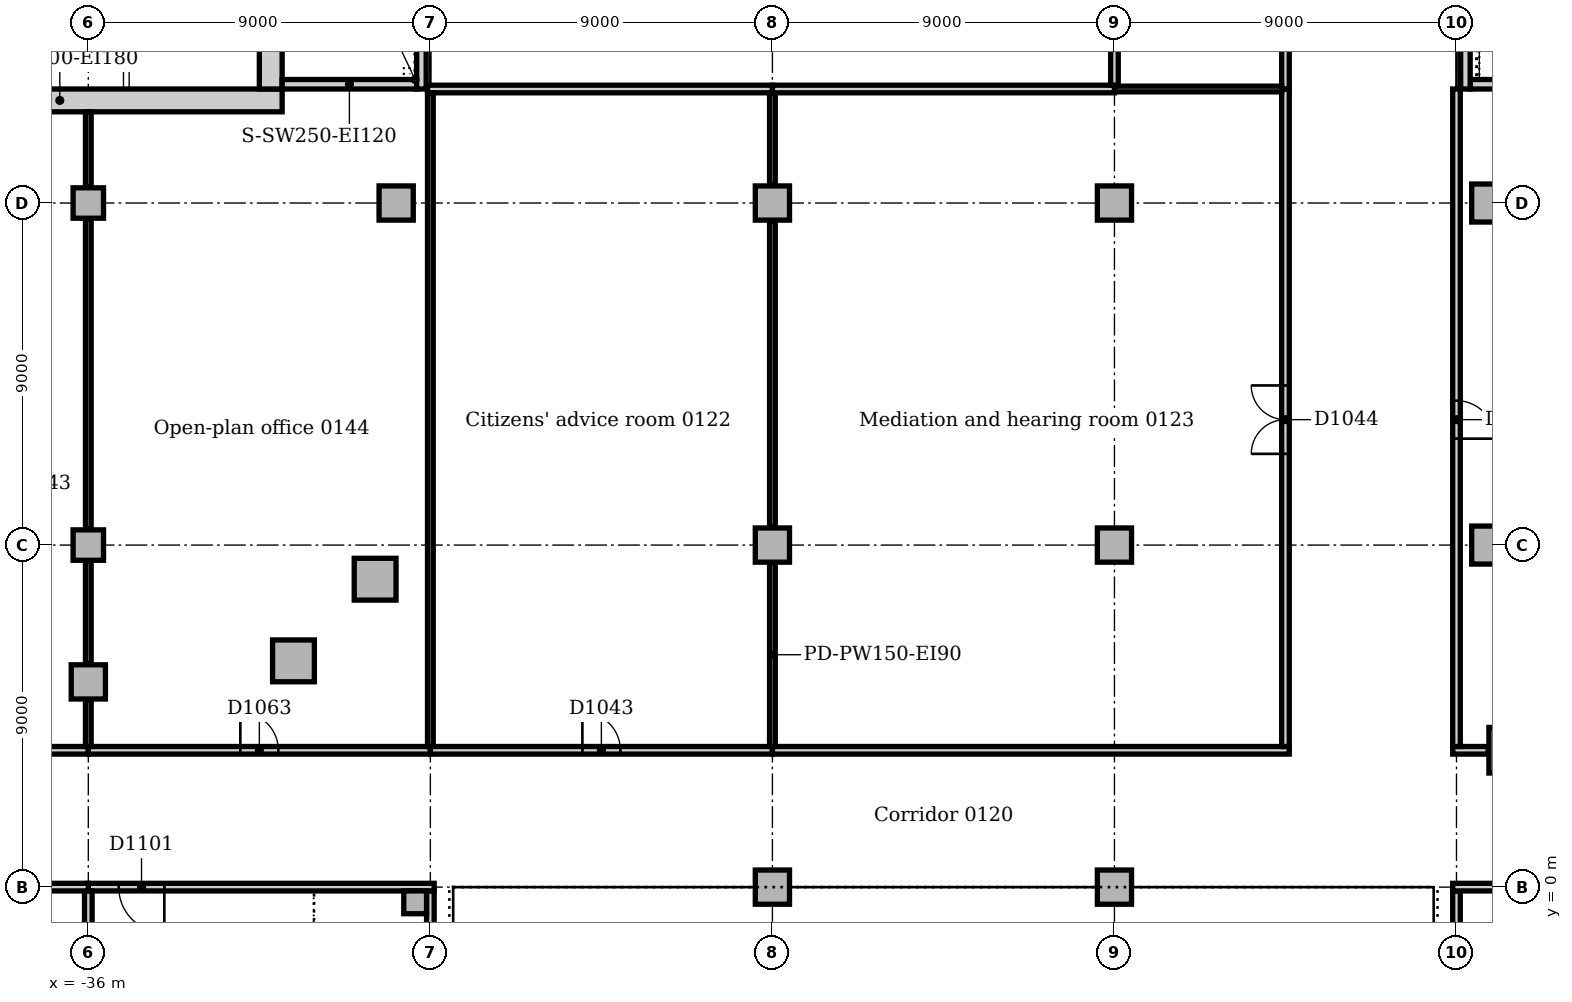
"""IFC4 building model, lengths in metres.
Left out: names, types, materials, properties, quantities, classifications, styles, units other than length and angle.
Written with IfcOpenShell. Run it as: python <this file> out.ifc"""

import sys

from ifc_helpers import new_model, si_unit, direction, frame, frame_2d, origin, origin_2d, place, context, subcontext, project, spatial, rectangle, extrude, element, fill, save


model = new_model("IFC4")
c1 = context("Model", 3, precision=1e-05, world=origin(), true_north=direction((0.0, 1.0)))
c2 = subcontext(c1, "Body", "Model", "MODEL_VIEW")
j1 = project(units=[si_unit("LENGTHUNIT", "METRE"), si_unit("PLANEANGLEUNIT", "RADIAN")], contexts=[c1])
p1 = place(None, origin())
s1 = spatial("IfcSite", under=j1, at=p1, CompositionType="ELEMENT")
p2 = place(p1, origin())
s2 = spatial("IfcBuilding", under=s1, at=p2, CompositionType="ELEMENT")
p3 = place(p2, frame((0.0, 0.0, 6.0)))
s3 = spatial("IfcBuildingStorey", under=s2, at=p3, CompositionType="ELEMENT", Elevation=6.0)
p4 = place(p3, frame((0.36, 21.125, 0.0), z_axis=(0.0, 0.0, 1.0), x_axis=(1.0, 0.0, 0.0)))
e1 = element("IfcWall", 1, at=p4, inside=s3, PredefinedType="SOLIDWALL", context=c2, shape_type="SweptSolid", body=[
    extrude(rectangle(XDim=3.54, YDim=0.25, at=frame_2d((1.77, 0.0))), origin(), (0.0, 0.0, 1.0), 5.0),
])
p5 = place(p3, frame((0.235, 21.0, 0.0), z_axis=(0.0, 0.0, 1.0), x_axis=(0.0, 1.0, 0.0)))
e2 = element("IfcWall", 2, at=p5, inside=s3, PredefinedType="SOLIDWALL", context=c2, shape_type="SweptSolid", body=[
    extrude(rectangle(XDim=21.0, YDim=0.25, at=frame_2d((10.5, 0.0))), origin(), (0.0, 0.0, 1.0), 5.0),
])
p6 = place(p3, frame((1.453, 3.602, 0.0), z_axis=(0.0, 0.0, 1.0), x_axis=(1.0, 0.0, 0.0)))
e3 = element("IfcColumn", 3, at=p6, inside=s3, PredefinedType="COLUMN", context=c2, shape_type="SweptSolid", body=[
    extrude(rectangle(XDim=1.2, YDim=1.2, at=origin_2d()), origin(), (0.0, 0.0, 1.0), 4.7),
])
for number, where, z_axis, x_axis in (
    (4, (0.9, 9.0, 0.0), (0.0, 0.0, 1.0), (1.0, 0.0, 0.0)),
    (5, (0.9, 18.0, 0.0), (0.0, 0.0, 1.0), (1.0, 0.0, 0.0)),
):
    element("IfcColumn", number, at=place(p3, frame(where, z_axis=z_axis, x_axis=x_axis)), inside=s3, PredefinedType="COLUMN", context=c2, shape_type="SweptSolid", body=[
        extrude(rectangle(XDim=1.0, YDim=1.0, at=origin_2d()), origin(), (0.0, 0.0, 1.0), 4.7),
    ])
p7 = place(p3, frame((-42.6, 20.7, 0.0), z_axis=(0.0, 0.0, 1.0), x_axis=(1.0, 0.0, 0.0)))
e6 = element("IfcWall", 6, at=p7, inside=s3, PredefinedType="SOLIDWALL", context=c2, shape_type="SweptSolid", body=[
    extrude(rectangle(XDim=11.7, YDim=0.6, at=frame_2d((5.85, 0.0))), origin(), (0.0, 0.0, 1.0), 5.0),
])
p8 = place(p3, frame((-31.2, 21.0, 0.0), z_axis=(0.0, 0.0, 1.0), x_axis=(0.0, 1.0, 0.0)))
e7 = element("IfcWall", 7, at=p8, inside=s3, PredefinedType="SOLIDWALL", context=c2, shape_type="SweptSolid", body=[
    extrude(rectangle(XDim=9.5, YDim=0.6, at=frame_2d((4.75, 0.0))), origin(), (0.0, 0.0, 1.0), 5.0),
])
p9 = place(p8, frame((5.25, 0.0, 0.0)))
e8 = element("IfcOpeningElement", 8, at=p9, cuts=e7, PredefinedType="OPENING", context=c2, shape_type="SweptSolid", body=[
    extrude(rectangle(XDim=1.0, YDim=2.1, at=frame_2d((0.5, 1.05))), frame((0.0, 0.31, 0.0), z_axis=(0.0, -1.0, 0.0), x_axis=(1.0, 0.0, 0.0)), (0.0, 0.0, 1.0), 0.62),
])
p10 = place(p3, frame((-30.9, 21.125, 0.0), z_axis=(0.0, 0.0, 1.0), x_axis=(1.0, 0.0, 0.0)))
e9 = element("IfcWall", 9, at=p10, inside=s3, PredefinedType="SOLIDWALL", context=c2, shape_type="SweptSolid", body=[
    extrude(rectangle(XDim=3.54, YDim=0.25, at=frame_2d((1.77, 0.0))), origin(), (0.0, 0.0, 1.0), 5.0),
])
p11 = place(p3, frame((-27.235, 21.0, 0.0), z_axis=(0.0, 0.0, 1.0), x_axis=(0.0, 1.0, 0.0)))
e10 = element("IfcWall", 10, at=p11, inside=s3, PredefinedType="SOLIDWALL", context=c2, shape_type="SweptSolid", body=[
    extrude(rectangle(XDim=6.65, YDim=0.25, at=frame_2d((3.325, 0.0))), origin(), (0.0, 0.0, 1.0), 5.0),
])
for number, where, z_axis, x_axis in (
    (11, (-30.602, 5.953, 0.0), (0.0, 0.0, 1.0), (1.0, 0.0, 0.0)),
    (12, (-28.453, 8.102, 0.0), (0.0, 0.0, 1.0), (1.0, 0.0, 0.0)),
):
    element("IfcColumn", number, at=place(p3, frame(where, z_axis=z_axis, x_axis=x_axis)), inside=s3, PredefinedType="COLUMN", context=c2, shape_type="SweptSolid", body=[
        extrude(rectangle(XDim=1.1, YDim=1.1, at=origin_2d()), origin(), (0.0, 0.0, 1.0), 4.7),
    ])
for number, where, z_axis, x_axis in (
    (13, (-36.0, 5.4, 0.0), (0.0, 0.0, 1.0), (1.0, 0.0, 0.0)),
    (14, (-27.9, 18.0, 0.0), (0.0, 0.0, 1.0), (1.0, 0.0, 0.0)),
):
    element("IfcColumn", number, at=place(p3, frame(where, z_axis=z_axis, x_axis=x_axis)), inside=s3, PredefinedType="COLUMN", context=c2, shape_type="SweptSolid", body=[
        extrude(rectangle(XDim=0.9, YDim=0.9, at=origin_2d()), origin(), (0.0, 0.0, 1.0), 4.7),
    ])
for number, where, z_axis, x_axis in (
    (15, (-36.0, 9.0, 0.0), (0.0, 0.0, 1.0), (1.0, 0.0, 0.0)),
    (16, (-36.0, 18.0, 0.0), (0.0, 0.0, 1.0), (1.0, 0.0, 0.0)),
):
    element("IfcColumn", number, at=place(p3, frame(where, z_axis=z_axis, x_axis=x_axis)), inside=s3, PredefinedType="COLUMN", context=c2, shape_type="SweptSolid", body=[
        extrude(rectangle(XDim=0.8, YDim=0.8, at=origin_2d()), origin(), (0.0, 0.0, 1.0), 4.7),
    ])
for number, where, z_axis, x_axis in (
    (17, (-18.0, 0.0, 0.0), (0.0, 0.0, 1.0), (1.0, 0.0, 0.0)),
    (18, (-18.0, 9.0, 0.0), (0.0, 0.0, 1.0), (1.0, 0.0, 0.0)),
    (19, (-18.0, 18.0, 0.0), (0.0, 0.0, 1.0), (1.0, 0.0, 0.0)),
    (20, (-9.0, 0.0, 0.0), (0.0, 0.0, 1.0), (1.0, 0.0, 0.0)),
    (21, (-9.0, 9.0, 0.0), (0.0, 0.0, 1.0), (1.0, 0.0, 0.0)),
    (22, (-9.0, 18.0, 0.0), (0.0, 0.0, 1.0), (1.0, 0.0, 0.0)),
):
    element("IfcColumn", number, at=place(p3, frame(where, z_axis=z_axis, x_axis=x_axis)), inside=s3, PredefinedType="COLUMN", context=c2, shape_type="SweptSolid", body=[
        extrude(rectangle(XDim=0.9, YDim=0.9, at=origin_2d()), origin(), (0.0, 0.0, 1.0), 4.7),
    ])
p12 = place(p3, frame((-27.4, -0.4, 0.0), z_axis=(0.0, 0.0, 1.0), x_axis=(1.0, 0.0, 0.0)))
e23 = element("IfcColumn", 23, at=p12, inside=s3, PredefinedType="COLUMN", context=c2, shape_type="SweptSolid", body=[
    extrude(rectangle(XDim=0.6, YDim=0.6, at=origin_2d()), origin(), (0.0, 0.0, 1.0), 5.0),
])
p13 = place(p3, frame((-27.0, -4.65, 0.0), z_axis=(0.0, 0.0, 1.0), x_axis=(0.0, 1.0, 0.0)))
e24 = element("IfcWall", 24, at=p13, inside=s3, PredefinedType="PARTITIONING", context=c2, shape_type="SweptSolid", body=[
    extrude(rectangle(XDim=4.55, YDim=0.2, at=frame_2d((2.275, 0.0))), origin(), (0.0, 0.0, 1.0), 4.7),
])
p14 = place(p3, frame((-36.0, 0.0, 0.0), z_axis=(0.0, 0.0, 1.0), x_axis=(1.0, 0.0, 0.0)))
e25 = element("IfcWall", 25, at=p14, inside=s3, PredefinedType="SOLIDWALL", context=c2, shape_type="SweptSolid", body=[
    extrude(rectangle(XDim=9.1, YDim=0.2, at=frame_2d((4.55, 0.0))), origin(), (0.0, 0.0, 1.0), 4.7),
])
p15 = place(p14, frame((0.8, 0.0, 0.0)))
e26 = element("IfcOpeningElement", 26, at=p15, cuts=e25, PredefinedType="OPENING", context=c2, shape_type="SweptSolid", body=[
    extrude(rectangle(XDim=1.2, YDim=2.1, at=frame_2d((0.6, 1.05))), frame((0.0, 0.11, 0.0), z_axis=(0.0, -1.0, 0.0), x_axis=(1.0, 0.0, 0.0)), (0.0, 0.0, 1.0), 0.22),
])
p16 = place(p3, frame((-36.0, -4.55, 0.0), z_axis=(0.0, 0.0, 1.0), x_axis=(0.0, 1.0, 0.0)))
e27 = element("IfcWall", 27, at=p16, inside=s3, PredefinedType="SOLIDWALL", context=c2, shape_type="SweptSolid", body=[
    extrude(rectangle(XDim=4.45, YDim=0.2, at=frame_2d((2.225, 0.0))), origin(), (0.0, 0.0, 1.0), 4.7),
])
p17 = place(p3, frame((0.0, -8.53, 0.0), z_axis=(0.0, 0.0, 1.0), x_axis=(0.0, 1.0, 0.0)))
e28 = element("IfcWall", 28, at=p17, inside=s3, PredefinedType="PARTITIONING", context=c2, shape_type="SweptSolid", body=[
    extrude(rectangle(XDim=8.43, YDim=0.2, at=frame_2d((4.215, 0.0))), origin(), (0.0, 0.0, 1.0), 4.7),
])
p18 = place(p3, frame((-45.0, 0.0, 0.0), z_axis=(0.0, 0.0, 1.0), x_axis=(1.0, 0.0, 0.0)))
e29 = element("IfcWall", 29, at=p18, inside=s3, PredefinedType="PARTITIONING", context=c2, shape_type="SweptSolid", body=[
    extrude(rectangle(XDim=9.0, YDim=0.2, at=frame_2d((4.5, 0.0))), origin(), (0.0, 0.0, 1.0), 4.7),
])
p19 = place(p18, frame((4.0, 0.0, 0.0)))
e30 = element("IfcOpeningElement", 30, at=p19, cuts=e29, PredefinedType="OPENING", context=c2, shape_type="SweptSolid", body=[
    extrude(rectangle(XDim=1.0, YDim=2.1, at=frame_2d((0.5, 1.05))), frame((0.0, 0.11, 0.0), z_axis=(0.0, -1.0, 0.0), x_axis=(1.0, 0.0, 0.0)), (0.0, 0.0, 1.0), 0.22),
])
p20 = place(p3, frame((-42.1, 3.6, 0.0), z_axis=(0.0, 0.0, 1.0), x_axis=(1.0, 0.0, 0.0)))
e31 = element("IfcWall", 31, at=p20, inside=s3, PredefinedType="PARTITIONING", context=c2, shape_type="SweptSolid", body=[
    extrude(rectangle(XDim=6.1, YDim=0.2, at=frame_2d((3.05, 0.0))), origin(), (0.0, 0.0, 1.0), 4.7),
])
p21 = place(p3, frame((-36.0, 3.6, 0.0), z_axis=(0.0, 0.0, 1.0), x_axis=(1.0, 0.0, 0.0)))
e32 = element("IfcWall", 32, at=p21, inside=s3, PredefinedType="PARTITIONING", context=c2, shape_type="SweptSolid", body=[
    extrude(rectangle(XDim=9.0, YDim=0.2, at=frame_2d((4.5, 0.0))), origin(), (0.0, 0.0, 1.0), 4.7),
])
p22 = place(p21, frame((4.0, 0.0, 0.0)))
e33 = element("IfcOpeningElement", 33, at=p22, cuts=e32, PredefinedType="OPENING", context=c2, shape_type="SweptSolid", body=[
    extrude(rectangle(XDim=1.0, YDim=2.1, at=frame_2d((0.5, 1.05))), frame((0.0, 0.11, 0.0), z_axis=(0.0, -1.0, 0.0), x_axis=(1.0, 0.0, 0.0)), (0.0, 0.0, 1.0), 0.22),
])
p23 = place(p3, frame((-0.1, 0.0, 0.0), z_axis=(0.0, 0.0, 1.0), x_axis=(1.0, 0.0, 0.0)))
e34 = element("IfcWall", 34, at=p23, inside=s3, PredefinedType="PARTITIONING", context=c2, shape_type="SweptSolid", body=[
    extrude(rectangle(XDim=9.1, YDim=0.2, at=frame_2d((4.55, 0.0))), origin(), (0.0, 0.0, 1.0), 4.7),
])
p24 = place(p23, frame((4.4, 0.0, 0.0)))
e35 = element("IfcOpeningElement", 35, at=p24, cuts=e34, PredefinedType="OPENING", context=c2, shape_type="SweptSolid", body=[
    extrude(rectangle(XDim=1.0, YDim=2.1, at=frame_2d((0.5, 1.05))), frame((0.0, 0.11, 0.0), z_axis=(0.0, -1.0, 0.0), x_axis=(1.0, 0.0, 0.0)), (0.0, 0.0, 1.0), 0.22),
])
p25 = place(p3, frame((-0.1, 3.6, 0.0), z_axis=(0.0, 0.0, 1.0), x_axis=(1.0, 0.0, 0.0)))
e36 = element("IfcWall", 36, at=p25, inside=s3, PredefinedType="PARTITIONING", context=c2, shape_type="SweptSolid", body=[
    extrude(rectangle(XDim=0.933, YDim=0.2, at=frame_2d((0.467, 0.0))), origin(), (0.0, 0.0, 1.0), 4.7),
])
p26 = place(p3, frame((-27.0, 3.6, 0.0), z_axis=(0.0, 0.0, 1.0), x_axis=(1.0, 0.0, 0.0)))
e37 = element("IfcWall", 37, at=p26, inside=s3, PredefinedType="PARTITIONING", context=c2, shape_type="SweptSolid", body=[
    extrude(rectangle(XDim=9.0, YDim=0.2, at=frame_2d((4.5, 0.0))), origin(), (0.0, 0.0, 1.0), 4.7),
])
p27 = place(p26, frame((4.0, 0.0, 0.0)))
e38 = element("IfcOpeningElement", 38, at=p27, cuts=e37, PredefinedType="OPENING", context=c2, shape_type="SweptSolid", body=[
    extrude(rectangle(XDim=1.0, YDim=2.1, at=frame_2d((0.5, 1.05))), frame((0.0, 0.11, 0.0), z_axis=(0.0, -1.0, 0.0), x_axis=(1.0, 0.0, 0.0)), (0.0, 0.0, 1.0), 0.22),
])
p28 = place(p3, frame((-18.0, 3.6, 0.0), z_axis=(0.0, 0.0, 1.0), x_axis=(1.0, 0.0, 0.0)))
e39 = element("IfcWall", 39, at=p28, inside=s3, PredefinedType="PARTITIONING", context=c2, shape_type="SweptSolid", body=[
    extrude(rectangle(XDim=13.6, YDim=0.2, at=frame_2d((6.8, 0.0))), origin(), (0.0, 0.0, 1.0), 4.7),
])
p29 = place(p3, frame((-4.5, 3.7, 0.0), z_axis=(0.0, 0.0, 1.0), x_axis=(0.0, 1.0, 0.0)))
e40 = element("IfcWall", 40, at=p29, inside=s3, PredefinedType="PARTITIONING", context=c2, shape_type="SweptSolid", body=[
    extrude(rectangle(XDim=17.3, YDim=0.2, at=frame_2d((8.65, 0.0))), origin(), (0.0, 0.0, 1.0), 4.7),
])
p30 = place(p29, frame((7.7, 0.0, 0.0)))
e41 = element("IfcOpeningElement", 41, at=p30, cuts=e40, PredefinedType="OPENING", context=c2, shape_type="SweptSolid", body=[
    extrude(rectangle(XDim=1.8, YDim=2.1, at=frame_2d((0.9, 1.05))), frame((0.0, 0.11, 0.0), z_axis=(0.0, -1.0, 0.0), x_axis=(1.0, 0.0, 0.0)), (0.0, 0.0, 1.0), 0.22),
])
p31 = place(p3, frame((-4.5, 21.0, 0.0), z_axis=(0.0, 0.0, 1.0), x_axis=(0.0, 1.0, 0.0)))
e42 = element("IfcWall", 42, at=p31, inside=s3, PredefinedType="PARTITIONING", context=c2, shape_type="SweptSolid", body=[
    extrude(rectangle(XDim=8.9, YDim=0.2, at=frame_2d((4.45, 0.0))), origin(), (0.0, 0.0, 1.0), 4.7),
])
p32 = place(p3, frame((0.0, 3.7, 0.0), z_axis=(0.0, 0.0, 1.0), x_axis=(0.0, 1.0, 0.0)))
e43 = element("IfcWall", 43, at=p32, inside=s3, PredefinedType="PARTITIONING", context=c2, shape_type="SweptSolid", body=[
    extrude(rectangle(XDim=17.3, YDim=0.2, at=frame_2d((8.65, 0.0))), origin(), (0.0, 0.0, 1.0), 4.7),
])
p33 = place(p32, frame((8.1, 0.0, 0.0)))
e44 = element("IfcOpeningElement", 44, at=p33, cuts=e43, PredefinedType="OPENING", context=c2, shape_type="SweptSolid", body=[
    extrude(rectangle(XDim=1.0, YDim=2.1, at=frame_2d((0.5, 1.05))), frame((0.0, 0.11, 0.0), z_axis=(0.0, -1.0, 0.0), x_axis=(1.0, 0.0, 0.0)), (0.0, 0.0, 1.0), 0.22),
])
p34 = place(p3, frame((-18.0, 3.7, 0.0), z_axis=(0.0, 0.0, 1.0), x_axis=(0.0, 1.0, 0.0)))
e45 = element("IfcWall", 45, at=p34, inside=s3, PredefinedType="PARTITIONING", context=c2, shape_type="SweptSolid", body=[
    extrude(rectangle(XDim=4.83, YDim=0.15, at=frame_2d((2.415, 0.0))), origin(), (0.0, 0.0, 1.0), 4.7),
])
p35 = place(p3, frame((-18.0, 9.47, 0.0), z_axis=(0.0, 0.0, 1.0), x_axis=(0.0, 1.0, 0.0)))
e46 = element("IfcWall", 46, at=p35, inside=s3, PredefinedType="PARTITIONING", context=c2, shape_type="SweptSolid", body=[
    extrude(rectangle(XDim=8.06, YDim=0.15, at=frame_2d((4.03, 0.0))), origin(), (0.0, 0.0, 1.0), 4.7),
])
p36 = place(p3, frame((-18.0, 18.47, 0.0), z_axis=(0.0, 0.0, 1.0), x_axis=(0.0, 1.0, 0.0)))
e47 = element("IfcWall", 47, at=p36, inside=s3, PredefinedType="PARTITIONING", context=c2, shape_type="SweptSolid", body=[
    extrude(rectangle(XDim=2.43, YDim=0.15, at=frame_2d((1.215, 0.0))), origin(), (0.0, 0.0, 1.0), 4.7),
])
p37 = place(p3, frame((-27.075, 21.0, 0.0), z_axis=(0.0, 0.0, 1.0), x_axis=(1.0, 0.0, 0.0)))
e48 = element("IfcWall", 48, at=p37, inside=s3, PredefinedType="PARTITIONING", context=c2, shape_type="SweptSolid", body=[
    extrude(rectangle(XDim=9.075, YDim=0.2, at=frame_2d((4.537, 0.0))), origin(), (0.0, 0.0, 1.0), 4.7),
])
p38 = place(p3, frame((-27.0, 3.7, 0.0), z_axis=(0.0, 0.0, 1.0), x_axis=(0.0, 1.0, 0.0)))
e49 = element("IfcWall", 49, at=p38, inside=s3, PredefinedType="PARTITIONING", context=c2, shape_type="SweptSolid", body=[
    extrude(rectangle(XDim=17.2, YDim=0.15, at=frame_2d((8.6, 0.0))), origin(), (0.0, 0.0, 1.0), 4.7),
])
p39 = place(p3, frame((-9.0, 21.0, 0.0), z_axis=(0.0, 0.0, 1.0), x_axis=(1.0, 0.0, 0.0)))
e50 = element("IfcWall", 50, at=p39, inside=s3, PredefinedType="PARTITIONING", context=c2, shape_type="SweptSolid", body=[
    extrude(rectangle(XDim=4.4, YDim=0.15, at=frame_2d((2.2, 0.0))), origin(), (0.0, 0.0, 1.0), 4.7),
])
p40 = place(p3, frame((-18.0, 21.0, 0.0), z_axis=(0.0, 0.0, 1.0), x_axis=(1.0, 0.0, 0.0)))
e51 = element("IfcWall", 51, at=p40, inside=s3, PredefinedType="PARTITIONING", context=c2, shape_type="SweptSolid", body=[
    extrude(rectangle(XDim=9.0, YDim=0.2, at=frame_2d((4.5, 0.0))), origin(), (0.0, 0.0, 1.0), 4.7),
])
p41 = place(p3, frame((-9.0, 21.1, 0.0), z_axis=(0.0, 0.0, 1.0), x_axis=(0.0, 1.0, 0.0)))
e52 = element("IfcWall", 52, at=p41, inside=s3, PredefinedType="PARTITIONING", context=c2, shape_type="SweptSolid", body=[
    extrude(rectangle(XDim=5.43, YDim=0.2, at=frame_2d((2.715, 0.0))), origin(), (0.0, 0.0, 1.0), 4.7),
])
p42 = place(p41, frame((1.65, 0.0, 0.0)))
e53 = element("IfcOpeningElement", 53, at=p42, cuts=e52, PredefinedType="OPENING", context=c2, shape_type="SweptSolid", body=[
    extrude(rectangle(XDim=1.0, YDim=2.1, at=frame_2d((0.5, 1.05))), frame((0.0, 0.11, 0.0), z_axis=(0.0, -1.0, 0.0), x_axis=(1.0, 0.0, 0.0)), (0.0, 0.0, 1.0), 0.22),
])
p43 = place(p3, frame((-36.0, 3.7, 0.0), z_axis=(0.0, 0.0, 1.0), x_axis=(0.0, 1.0, 0.0)))
e54 = element("IfcWall", 54, at=p43, inside=s3, PredefinedType="PARTITIONING", context=c2, shape_type="SweptSolid", body=[
    extrude(rectangle(XDim=1.23, YDim=0.15, at=frame_2d((0.615, 0.0))), origin(), (0.0, 0.0, 1.0), 4.7),
])
p44 = place(p3, frame((-36.0, 5.87, 0.0), z_axis=(0.0, 0.0, 1.0), x_axis=(0.0, 1.0, 0.0)))
e55 = element("IfcWall", 55, at=p44, inside=s3, PredefinedType="PARTITIONING", context=c2, shape_type="SweptSolid", body=[
    extrude(rectangle(XDim=2.71, YDim=0.15, at=frame_2d((1.355, 0.0))), origin(), (0.0, 0.0, 1.0), 4.7),
])
p45 = place(p3, frame((-36.0, 9.42, 0.0), z_axis=(0.0, 0.0, 1.0), x_axis=(0.0, 1.0, 0.0)))
e56 = element("IfcWall", 56, at=p45, inside=s3, PredefinedType="PARTITIONING", context=c2, shape_type="SweptSolid", body=[
    extrude(rectangle(XDim=8.16, YDim=0.15, at=frame_2d((4.08, 0.0))), origin(), (0.0, 0.0, 1.0), 4.7),
])
p46 = place(p3, frame((-36.0, 18.42, 0.0), z_axis=(0.0, 0.0, 1.0), x_axis=(0.0, 1.0, 0.0)))
e57 = element("IfcWall", 57, at=p46, inside=s3, PredefinedType="PARTITIONING", context=c2, shape_type="SweptSolid", body=[
    extrude(rectangle(XDim=1.98, YDim=0.15, at=frame_2d((0.99, 0.0))), origin(), (0.0, 0.0, 1.0), 4.7),
])
p47 = place(p3, frame((0.48, 21.25, 0.0), z_axis=(0.0, 0.0, 1.0), x_axis=(0.0, 1.0, 0.0)))
e58 = element("IfcWall", 58, at=p47, inside=s3, PredefinedType="STANDARD", context=c2, shape_type="SweptSolid", body=[
    extrude(rectangle(XDim=1.955, YDim=0.24, at=frame_2d((0.978, 0.0))), origin(), (0.0, 0.0, 1.0), 5.0),
])
p48 = place(p3, frame((-35.0, 21.0, 0.0), z_axis=(0.0, 0.0, 1.0), x_axis=(0.0, 1.0, 0.0)))
e59 = element("IfcWall", 59, at=p48, inside=s3, PredefinedType="SOLIDWALL", context=c2, shape_type="SweptSolid", body=[
    extrude(rectangle(XDim=2.9, YDim=0.15, at=frame_2d((1.45, 0.0))), origin(), (0.0, 0.0, 1.0), 5.0),
])
p49 = place(p27, origin())
e60 = element("IfcDoor", 60, at=p49, inside=s3, OperationType="SINGLE_SWING_LEFT", PredefinedType="DOOR", context=c2, shape_type="SweptSolid", body=[
    extrude(rectangle(XDim=1.0, YDim=2.1, at=frame_2d((0.5, 1.05))), frame((0.0, 0.025, 0.0), z_axis=(0.0, -1.0, 0.0), x_axis=(1.0, 0.0, 0.0)), (0.0, 0.0, 1.0), 0.05),
])
fill(e38, e60)
p50 = place(p30, origin())
e61 = element("IfcDoor", 61, at=p50, inside=s3, OperationType="DOUBLE_DOOR_SINGLE_SWING", PredefinedType="DOOR", context=c2, shape_type="SweptSolid", body=[
    extrude(rectangle(XDim=1.8, YDim=2.1, at=frame_2d((0.9, 1.05))), frame((0.0, 0.025, 0.0), z_axis=(0.0, -1.0, 0.0), x_axis=(1.0, 0.0, 0.0)), (0.0, 0.0, 1.0), 0.05),
])
fill(e41, e61)
p51 = place(p22, origin())
e62 = element("IfcDoor", 62, at=p51, inside=s3, OperationType="SINGLE_SWING_LEFT", PredefinedType="DOOR", context=c2, shape_type="SweptSolid", body=[
    extrude(rectangle(XDim=1.0, YDim=2.1, at=frame_2d((0.5, 1.05))), frame((0.0, 0.025, 0.0), z_axis=(0.0, -1.0, 0.0), x_axis=(1.0, 0.0, 0.0)), (0.0, 0.0, 1.0), 0.05),
])
fill(e33, e62)
p52 = place(p33, frame((1.0, 0.0, 0.0), z_axis=(0.0, 0.0, 1.0), x_axis=(-1.0, 0.0, 0.0)))
e63 = element("IfcDoor", 63, at=p52, inside=s3, OperationType="SINGLE_SWING_RIGHT", PredefinedType="DOOR", context=c2, shape_type="SweptSolid", body=[
    extrude(rectangle(XDim=1.0, YDim=2.1, at=frame_2d((0.5, 1.05))), frame((0.0, 0.025, 0.0), z_axis=(0.0, -1.0, 0.0), x_axis=(1.0, 0.0, 0.0)), (0.0, 0.0, 1.0), 0.05),
])
fill(e44, e63)
p53 = place(p15, frame((1.2, 0.0, 0.0), z_axis=(0.0, 0.0, 1.0), x_axis=(-1.0, 0.0, 0.0)))
e64 = element("IfcDoor", 64, at=p53, inside=s3, OperationType="SINGLE_SWING_LEFT", PredefinedType="DOOR", context=c2, shape_type="SweptSolid", body=[
    extrude(rectangle(XDim=1.2, YDim=2.1, at=frame_2d((0.6, 1.05))), frame((0.0, 0.025, 0.0), z_axis=(0.0, -1.0, 0.0), x_axis=(1.0, 0.0, 0.0)), (0.0, 0.0, 1.0), 0.05),
])
fill(e26, e64)
save(model, sys.argv[1])
